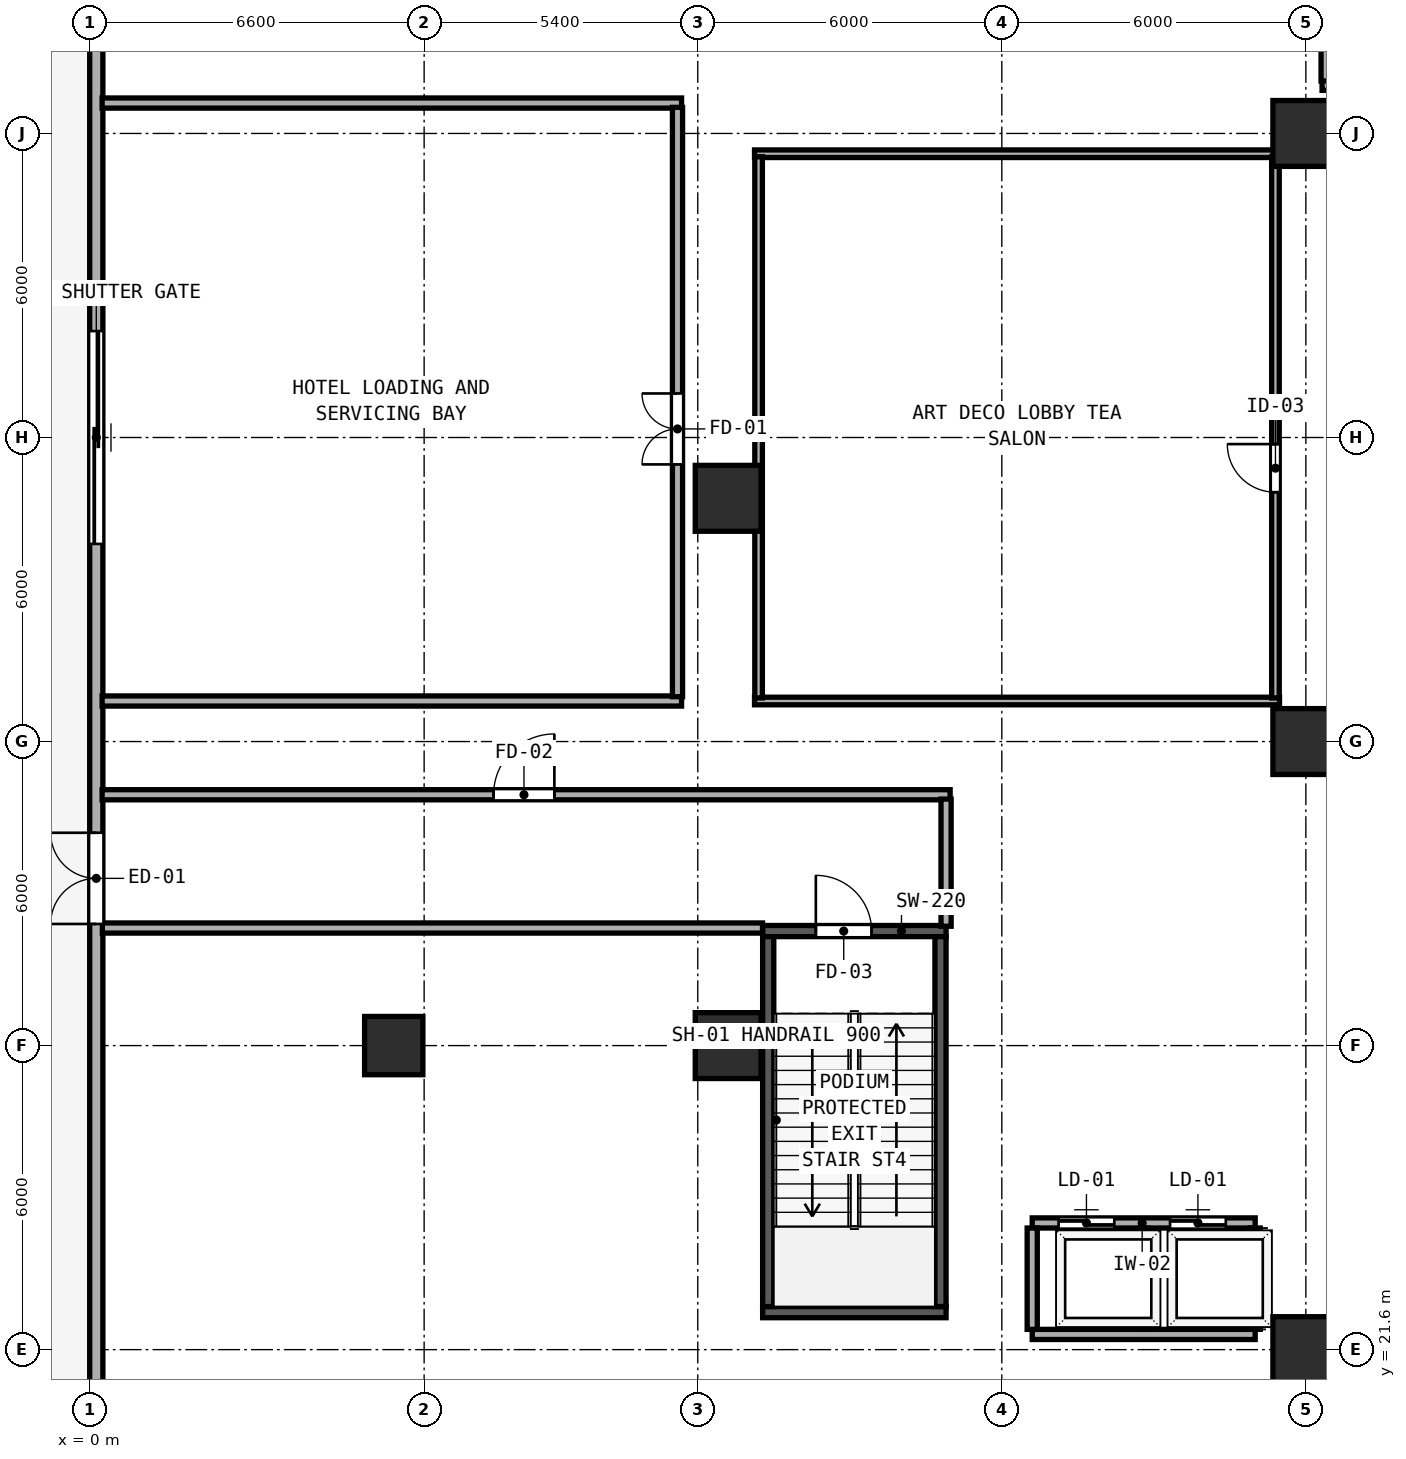
"""IFC4 building model, lengths in metres.
Left out: names, types, materials, properties, quantities, classifications, styles, units other than length and angle.
Written with IfcOpenShell. Run it as: python <this file> out.ifc"""

import sys

from ifc_helpers import new_model, si_unit, direction, frame, frame_2d, origin, origin_2d, place, context, subcontext, project, spatial, rectangle, hollow_rectangle, extrude, element, fill, save


model = new_model("IFC4")
c1 = context("Model", 3, precision=1e-05, world=origin(), true_north=direction((0.0, 1.0)))
c2 = subcontext(c1, "Body", "Model", "MODEL_VIEW")
j1 = project(units=[si_unit("LENGTHUNIT", "METRE"), si_unit("PLANEANGLEUNIT", "RADIAN")], contexts=[c1])
p1 = place(None, origin())
s1 = spatial("IfcSite", under=j1, at=p1, CompositionType="ELEMENT")
p2 = place(p1, origin())
s2 = spatial("IfcBuilding", under=s1, at=p2, CompositionType="ELEMENT")
p3 = place(p2, origin())
s3 = spatial("IfcBuildingStorey", under=s2, at=p3, CompositionType="ELEMENT", Elevation=0.0)
p4 = place(p3, frame((13.28, 29.86, 0.0), z_axis=(0.0, 0.0, 1.0), x_axis=(1.0, 0.0, 0.0)))
e1 = element("IfcWall", 1, at=p4, inside=s3, PredefinedType="SHEAR", context=c2, shape_type="SweptSolid", body=[
    extrude(rectangle(XDim=3.62, YDim=0.22, at=frame_2d((1.81, 0.0))), origin(), (0.0, 0.0, 1.0), 5.16),
])
p5 = place(p4, frame((1.05, 0.0, 0.0)))
e2 = element("IfcOpeningElement", 2, at=p5, cuts=e1, PredefinedType="OPENING", context=c2, shape_type="SweptSolid", body=[
    extrude(rectangle(XDim=1.1, YDim=2.15, at=frame_2d((0.55, 1.075))), frame((0.0, 0.12, 0.0), z_axis=(0.0, -1.0, 0.0), x_axis=(1.0, 0.0, 0.0)), (0.0, 0.0, 1.0), 0.24),
])
p6 = place(p3, frame((13.28, 22.34, 0.0), z_axis=(0.0, 0.0, 1.0), x_axis=(1.0, 0.0, 0.0)))
e3 = element("IfcWall", 3, at=p6, inside=s3, PredefinedType="SHEAR", context=c2, shape_type="SweptSolid", body=[
    extrude(rectangle(XDim=3.62, YDim=0.22, at=frame_2d((1.81, 0.0))), origin(), (0.0, 0.0, 1.0), 5.16),
])
for number, where, z_axis, x_axis in (
    (4, (13.39, 22.45, 0.0), (0.0, 0.0, 1.0), (0.0, 1.0, 0.0)),
    (5, (16.79, 22.45, 0.0), (0.0, 0.0, 1.0), (0.0, 1.0, 0.0)),
):
    element("IfcWall", number, at=place(p3, frame(where, z_axis=z_axis, x_axis=x_axis)), inside=s3, PredefinedType="SHEAR", context=c2, shape_type="SweptSolid", body=[
        extrude(rectangle(XDim=7.3, YDim=0.22, at=frame_2d((3.65, 0.0))), origin(), (0.0, 0.0, 1.0), 5.16),
    ])
for number, where, z_axis, x_axis in (
    (6, (24.0, 21.6, 0.0), (0.0, 0.0, 1.0), (1.0, 0.0, 0.0)),
    (7, (24.0, 33.6, 0.0), (0.0, 0.0, 1.0), (1.0, 0.0, 0.0)),
    (8, (24.0, 45.6, 0.0), (0.0, 0.0, 1.0), (1.0, 0.0, 0.0)),
    (9, (12.6, 27.6, 0.0), (0.0, 0.0, 1.0), (1.0, 0.0, 0.0)),
    (10, (12.6, 38.4, 0.0), (0.0, 0.0, 1.0), (1.0, 0.0, 0.0)),
):
    element("IfcColumn", number, at=place(p3, frame(where, z_axis=z_axis, x_axis=x_axis)), inside=s3, PredefinedType="COLUMN", context=c2, shape_type="SweptSolid", body=[
        extrude(hollow_rectangle(XDim=1.3, YDim=1.3, WallThickness=0.048, at=origin_2d()), origin(), (0.0, 0.0, 1.0), 5.4),
    ])
p7 = place(p3, frame((6.0, 27.6, 0.0), z_axis=(0.0, 0.0, 1.0), x_axis=(1.0, 0.0, 0.0)))
e11 = element("IfcColumn", 11, at=p7, inside=s3, PredefinedType="COLUMN", context=c2, shape_type="SweptSolid", body=[
    extrude(hollow_rectangle(XDim=1.15, YDim=1.15, WallThickness=0.042, at=origin_2d()), origin(), (0.0, 0.0, 1.0), 5.4),
])
p8 = place(p3, frame((0.13, 53.925, 0.0), z_axis=(0.0, 0.0, 1.0), x_axis=(0.0, -1.0, 0.0)))
e12 = element("IfcWall", 12, at=p8, inside=s3, PredefinedType="SOLIDWALL", context=c2, shape_type="SweptSolid", body=[
    extrude(rectangle(XDim=51.526, YDim=0.26, at=frame_2d((25.763, 0.0))), origin(), (0.0, 0.0, 1.0), 5.16),
])
p9 = place(p8, frame((23.925, 0.0, 0.0), z_axis=(0.0, 0.0, 1.0), x_axis=(-1.0, 0.0, 0.0)))
e13 = element("IfcOpeningElement", 13, at=p9, cuts=e12, PredefinedType="OPENING", context=c2, shape_type="SweptSolid", body=[
    extrude(rectangle(XDim=1.8, YDim=2.35, at=frame_2d((0.9, 1.175))), frame((0.0, 0.14, 0.0), z_axis=(0.0, -1.0, 0.0), x_axis=(1.0, 0.0, 0.0)), (0.0, 0.0, 1.0), 0.28),
])
p10 = place(p8, frame((16.425, 0.0, 0.0), z_axis=(0.0, 0.0, 1.0), x_axis=(-1.0, 0.0, 0.0)))
e14 = element("IfcOpeningElement", 14, at=p10, cuts=e12, PredefinedType="OPENING", context=c2, shape_type="SweptSolid", body=[
    extrude(rectangle(XDim=4.2, YDim=3.3, at=frame_2d((2.1, 1.65))), frame((0.0, 0.14, 0.0), z_axis=(0.0, -1.0, 0.0), x_axis=(1.0, 0.0, 0.0)), (0.0, 0.0, 1.0), 0.28),
])
p11 = place(p3, frame((18.6, 24.1, 0.0), z_axis=(0.0, 0.0, 1.0), x_axis=(1.0, 0.0, 0.0)))
e15 = element("IfcWall", 15, at=p11, inside=s3, PredefinedType="SOLIDWALL", context=c2, shape_type="SweptSolid", body=[
    extrude(rectangle(XDim=4.4, YDim=0.2, at=frame_2d((2.2, 0.0))), origin(), (0.0, 0.0, 1.0), 5.16),
])
p12 = place(p11, frame((0.52, 0.0, 0.0)))
e16 = element("IfcOpeningElement", 16, at=p12, cuts=e15, PredefinedType="OPENING", context=c2, shape_type="SweptSolid", body=[
    extrude(rectangle(XDim=1.1, YDim=2.2, at=frame_2d((0.55, 1.1))), frame((0.0, 0.11, 0.0), z_axis=(0.0, -1.0, 0.0), x_axis=(1.0, 0.0, 0.0)), (0.0, 0.0, 1.0), 0.22),
])
p13 = place(p11, frame((2.72, 0.0, 0.0)))
e17 = element("IfcOpeningElement", 17, at=p13, cuts=e15, PredefinedType="OPENING", context=c2, shape_type="SweptSolid", body=[
    extrude(rectangle(XDim=1.1, YDim=2.2, at=frame_2d((0.55, 1.1))), frame((0.0, 0.11, 0.0), z_axis=(0.0, -1.0, 0.0), x_axis=(1.0, 0.0, 0.0)), (0.0, 0.0, 1.0), 0.22),
])
p14 = place(p3, frame((18.6, 21.9, 0.0), z_axis=(0.0, 0.0, 1.0), x_axis=(1.0, 0.0, 0.0)))
e18 = element("IfcWall", 18, at=p14, inside=s3, PredefinedType="SOLIDWALL", context=c2, shape_type="SweptSolid", body=[
    extrude(rectangle(XDim=4.4, YDim=0.2, at=frame_2d((2.2, 0.0))), origin(), (0.0, 0.0, 1.0), 5.16),
])
for number, where, z_axis, x_axis in (
    (19, (18.6, 22.0, 0.0), (0.0, 0.0, 1.0), (0.0, 1.0, 0.0)),
    (20, (23.0, 22.0, 0.0), (0.0, 0.0, 1.0), (0.0, 1.0, 0.0)),
):
    element("IfcWall", number, at=place(p3, frame(where, z_axis=z_axis, x_axis=x_axis)), inside=s3, PredefinedType="SOLIDWALL", context=c2, shape_type="SweptSolid", body=[
        extrude(rectangle(XDim=2.0, YDim=0.2, at=frame_2d((1.0, 0.0))), origin(), (0.0, 0.0, 1.0), 5.16),
    ])
p15 = place(p3, frame((20.8, 22.0, 0.0), z_axis=(0.0, 0.0, 1.0), x_axis=(0.0, 1.0, 0.0)))
e21 = element("IfcWall", 21, at=p15, inside=s3, PredefinedType="SOLIDWALL", context=c2, shape_type="SweptSolid", body=[
    extrude(rectangle(XDim=2.0, YDim=0.16, at=frame_2d((1.0, 0.0))), origin(), (0.0, 0.0, 1.0), 5.16),
])
p16 = place(p3, frame((0.245, 32.55, 0.0), z_axis=(0.0, 0.0, 1.0), x_axis=(1.0, 0.0, 0.0)))
e22 = element("IfcWall", 22, at=p16, inside=s3, PredefinedType="SOLIDWALL", context=c2, shape_type="SweptSolid", body=[
    extrude(rectangle(XDim=16.735, YDim=0.2, at=frame_2d((8.367, 0.0))), origin(), (0.0, 0.0, 1.0), 5.16),
])
p17 = place(p16, frame((8.925, 0.0, 0.0), z_axis=(0.0, 0.0, 1.0), x_axis=(-1.0, 0.0, 0.0)))
e23 = element("IfcOpeningElement", 23, at=p17, cuts=e22, PredefinedType="OPENING", context=c2, shape_type="SweptSolid", body=[
    extrude(rectangle(XDim=1.2, YDim=2.15, at=frame_2d((0.6, 1.075))), frame((0.0, 0.11, 0.0), z_axis=(0.0, -1.0, 0.0), x_axis=(1.0, 0.0, 0.0)), (0.0, 0.0, 1.0), 0.22),
])
p18 = place(p3, frame((16.9, 29.955, 0.0), z_axis=(0.0, 0.0, 1.0), x_axis=(0.0, 1.0, 0.0)))
e24 = element("IfcWall", 24, at=p18, inside=s3, PredefinedType="SOLIDWALL", context=c2, shape_type="SweptSolid", body=[
    extrude(rectangle(XDim=2.51, YDim=0.2, at=frame_2d((1.255, 0.0))), origin(), (0.0, 0.0, 1.0), 5.16),
])
p19 = place(p3, frame((0.25, 29.92, 0.0), z_axis=(0.0, 0.0, 1.0), x_axis=(1.0, 0.0, 0.0)))
e25 = element("IfcWall", 25, at=p19, inside=s3, PredefinedType="SOLIDWALL", context=c2, shape_type="SweptSolid", body=[
    extrude(rectangle(XDim=13.028, YDim=0.2, at=frame_2d((6.514, 0.0))), origin(), (0.0, 0.0, 1.0), 5.16),
])
p20 = place(p3, frame((24.32, 46.55, 0.0), z_axis=(0.0, 0.0, 1.0), x_axis=(1.0, 0.0, 0.0)))
e26 = element("IfcWall", 26, at=p20, inside=s3, PredefinedType="SOLIDWALL", context=c2, shape_type="SweptSolid", body=[
    extrude(rectangle(XDim=7.095, YDim=0.2, at=frame_2d((3.547, 0.0))), origin(), (0.0, 0.0, 1.0), 5.16),
])
p21 = place(p20, frame((2.2, 0.0, 0.0)))
e27 = element("IfcOpeningElement", 27, at=p21, cuts=e26, PredefinedType="OPENING", context=c2, shape_type="SweptSolid", body=[
    extrude(rectangle(XDim=1.1, YDim=2.15, at=frame_2d((0.55, 1.075))), frame((0.0, 0.11, 0.0), z_axis=(0.0, -1.0, 0.0), x_axis=(1.0, 0.0, 0.0)), (0.0, 0.0, 1.0), 0.22),
])
p22 = place(p3, frame((24.4, 46.635, 0.0), z_axis=(0.0, 0.0, 1.0), x_axis=(0.0, 1.0, 0.0)))
e28 = element("IfcWall", 28, at=p22, inside=s3, PredefinedType="SOLIDWALL", context=c2, shape_type="SweptSolid", body=[
    extrude(rectangle(XDim=7.12, YDim=0.2, at=frame_2d((3.56, 0.0))), origin(), (0.0, 0.0, 1.0), 5.16),
])
for number, where, z_axis, x_axis in (
    (29, (13.12, 45.2, 0.0), (0.0, 0.0, 1.0), (1.0, 0.0, 0.0)),
    (30, (13.12, 34.4, 0.0), (0.0, 0.0, 1.0), (1.0, 0.0, 0.0)),
):
    element("IfcWall", number, at=place(p3, frame(where, z_axis=z_axis, x_axis=x_axis)), inside=s3, PredefinedType="PARTITIONING", context=c2, shape_type="SweptSolid", body=[
        extrude(rectangle(XDim=10.36, YDim=0.15, at=frame_2d((5.18, 0.0))), origin(), (0.0, 0.0, 1.0), 5.16),
    ])
p23 = place(p3, frame((13.2, 34.46, 0.0), z_axis=(0.0, 0.0, 1.0), x_axis=(0.0, 1.0, 0.0)))
e31 = element("IfcWall", 31, at=p23, inside=s3, PredefinedType="PARTITIONING", context=c2, shape_type="SweptSolid", body=[
    extrude(rectangle(XDim=10.68, YDim=0.15, at=frame_2d((5.34, 0.0))), origin(), (0.0, 0.0, 1.0), 5.16),
])
p24 = place(p3, frame((23.4, 34.46, 0.0), z_axis=(0.0, 0.0, 1.0), x_axis=(0.0, 1.0, 0.0)))
e32 = element("IfcWall", 32, at=p24, inside=s3, PredefinedType="PARTITIONING", context=c2, shape_type="SweptSolid", body=[
    extrude(rectangle(XDim=10.68, YDim=0.15, at=frame_2d((5.34, 0.0))), origin(), (0.0, 0.0, 1.0), 5.16),
])
p25 = place(p24, frame((5.01, 0.0, 0.0), z_axis=(0.0, 0.0, 1.0), x_axis=(-1.0, 0.0, 0.0)))
e33 = element("IfcOpeningElement", 33, at=p25, cuts=e32, PredefinedType="OPENING", context=c2, shape_type="SweptSolid", body=[
    extrude(rectangle(XDim=0.95, YDim=2.12, at=frame_2d((0.475, 1.06))), frame((0.0, 0.085, 0.0), z_axis=(0.0, -1.0, 0.0), x_axis=(1.0, 0.0, 0.0)), (0.0, 0.0, 1.0), 0.17),
])
for number, where, z_axis, x_axis in (
    (34, (0.245, 46.2, 0.0), (0.0, 0.0, 1.0), (1.0, 0.0, 0.0)),
    (35, (0.245, 34.4, 0.0), (0.0, 0.0, 1.0), (1.0, 0.0, 0.0)),
):
    element("IfcWall", number, at=place(p3, frame(where, z_axis=z_axis, x_axis=x_axis)), inside=s3, PredefinedType="SOLIDWALL", context=c2, shape_type="SweptSolid", body=[
        extrude(rectangle(XDim=11.435, YDim=0.2, at=frame_2d((5.717, 0.0))), origin(), (0.0, 0.0, 1.0), 5.16),
    ])
p26 = place(p3, frame((11.6, 34.485, 0.0), z_axis=(0.0, 0.0, 1.0), x_axis=(0.0, 1.0, 0.0)))
e36 = element("IfcWall", 36, at=p26, inside=s3, PredefinedType="SOLIDWALL", context=c2, shape_type="SweptSolid", body=[
    extrude(rectangle(XDim=11.63, YDim=0.2, at=frame_2d((5.815, 0.0))), origin(), (0.0, 0.0, 1.0), 5.16),
])
p27 = place(p26, frame((4.584, 0.0, 0.0)))
e37 = element("IfcOpeningElement", 37, at=p27, cuts=e36, PredefinedType="OPENING", context=c2, shape_type="SweptSolid", body=[
    extrude(rectangle(XDim=1.4, YDim=2.2, at=frame_2d((0.7, 1.1))), frame((0.0, 0.11, 0.0), z_axis=(0.0, -1.0, 0.0), x_axis=(1.0, 0.0, 0.0)), (0.0, 0.0, 1.0), 0.22),
])
p28 = place(p9, origin())
e38 = element("IfcDoor", 38, at=p28, inside=s3, OperationType="DOUBLE_DOOR_SINGLE_SWING", PredefinedType="DOOR", context=c2, shape_type="SweptSolid", body=[
    extrude(rectangle(XDim=1.8, YDim=2.35, at=frame_2d((0.9, 1.175))), frame((0.0, 0.025, 0.0), z_axis=(0.0, -1.0, 0.0), x_axis=(1.0, 0.0, 0.0)), (0.0, 0.0, 1.0), 0.05),
])
fill(e13, e38)
p29 = place(p10, origin())
e39 = element("IfcDoor", 39, at=p29, inside=s3, OperationType="SLIDING_TO_RIGHT", PredefinedType="GATE", context=c2, shape_type="SweptSolid", body=[
    extrude(rectangle(XDim=4.2, YDim=3.3, at=frame_2d((2.1, 1.65))), frame((0.0, 0.025, 0.0), z_axis=(0.0, -1.0, 0.0), x_axis=(1.0, 0.0, 0.0)), (0.0, 0.0, 1.0), 0.05),
])
fill(e14, e39)
p30 = place(p5, origin())
e40 = element("IfcDoor", 40, at=p30, inside=s3, OperationType="SINGLE_SWING_LEFT", PredefinedType="DOOR", context=c2, shape_type="SweptSolid", body=[
    extrude(rectangle(XDim=1.1, YDim=2.15, at=frame_2d((0.55, 1.075))), frame((0.0, 0.025, 0.0), z_axis=(0.0, -1.0, 0.0), x_axis=(1.0, 0.0, 0.0)), (0.0, 0.0, 1.0), 0.05),
])
fill(e2, e40)
p31 = place(p12, origin())
e41 = element("IfcDoor", 41, at=p31, inside=s3, OperationType="SLIDING_TO_LEFT", PredefinedType="DOOR", context=c2, shape_type="SweptSolid", body=[
    extrude(rectangle(XDim=1.1, YDim=2.2, at=frame_2d((0.55, 1.1))), frame((0.0, 0.025, 0.0), z_axis=(0.0, -1.0, 0.0), x_axis=(1.0, 0.0, 0.0)), (0.0, 0.0, 1.0), 0.05),
])
fill(e16, e41)
p32 = place(p13, origin())
e42 = element("IfcDoor", 42, at=p32, inside=s3, OperationType="SLIDING_TO_LEFT", PredefinedType="DOOR", context=c2, shape_type="SweptSolid", body=[
    extrude(rectangle(XDim=1.1, YDim=2.2, at=frame_2d((0.55, 1.1))), frame((0.0, 0.025, 0.0), z_axis=(0.0, -1.0, 0.0), x_axis=(1.0, 0.0, 0.0)), (0.0, 0.0, 1.0), 0.05),
])
fill(e17, e42)
p33 = place(p17, origin())
e43 = element("IfcDoor", 43, at=p33, inside=s3, OperationType="SINGLE_SWING_LEFT", PredefinedType="DOOR", context=c2, shape_type="SweptSolid", body=[
    extrude(rectangle(XDim=1.2, YDim=2.15, at=frame_2d((0.6, 1.075))), frame((0.0, 0.025, 0.0), z_axis=(0.0, -1.0, 0.0), x_axis=(1.0, 0.0, 0.0)), (0.0, 0.0, 1.0), 0.05),
])
fill(e23, e43)
p34 = place(p25, origin())
e44 = element("IfcDoor", 44, at=p34, inside=s3, OperationType="SINGLE_SWING_LEFT", PredefinedType="DOOR", context=c2, shape_type="SweptSolid", body=[
    extrude(rectangle(XDim=0.95, YDim=2.12, at=frame_2d((0.475, 1.06))), frame((0.0, 0.025, 0.0), z_axis=(0.0, -1.0, 0.0), x_axis=(1.0, 0.0, 0.0)), (0.0, 0.0, 1.0), 0.05),
])
fill(e33, e44)
p35 = place(p27, origin())
e45 = element("IfcDoor", 45, at=p35, inside=s3, OperationType="DOUBLE_DOOR_SINGLE_SWING", PredefinedType="DOOR", context=c2, shape_type="SweptSolid", body=[
    extrude(rectangle(XDim=1.4, YDim=2.2, at=frame_2d((0.7, 1.1))), frame((0.0, 0.025, 0.0), z_axis=(0.0, -1.0, 0.0), x_axis=(1.0, 0.0, 0.0)), (0.0, 0.0, 1.0), 0.05),
])
fill(e37, e45)
save(model, sys.argv[1])
